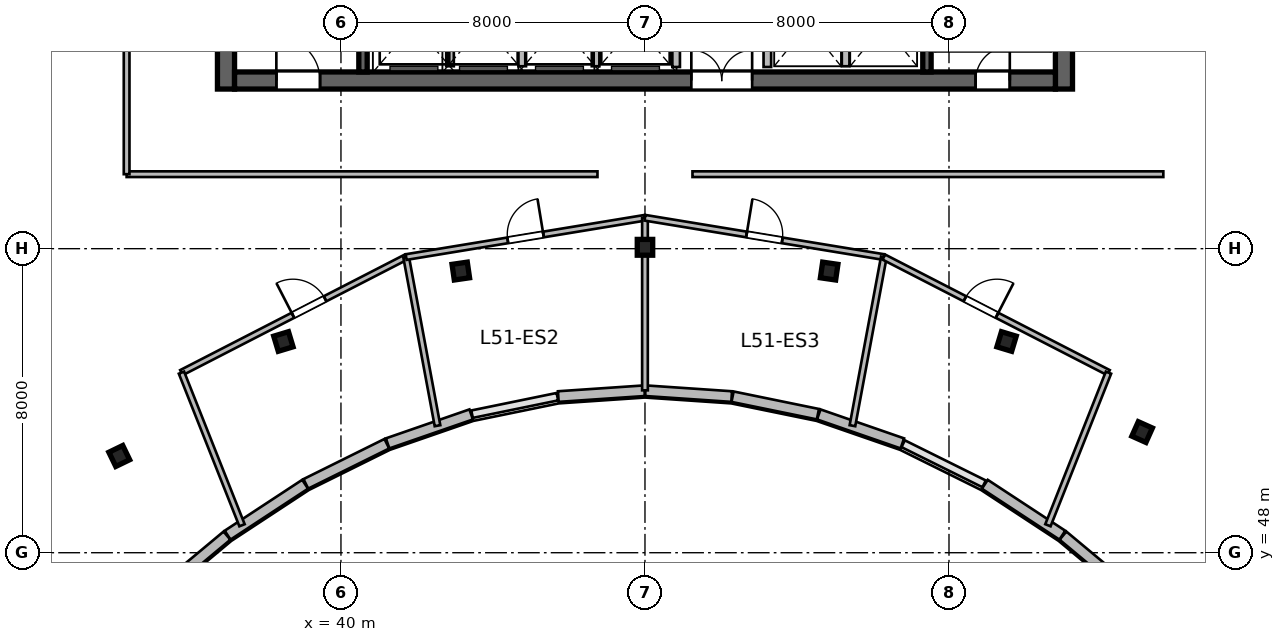
"""IFC4 building model, lengths in metres.
Left out: names, types, materials, properties, quantities, classifications, styles, units other than length and angle.
Written with IfcOpenShell. Run it as: python <this file> out.ifc"""

import sys

from ifc_helpers import new_model, si_unit, direction, frame, frame_2d, origin, origin_2d, place, context, subcontext, project, spatial, rectangle, i_section, extrude, source, transform, mapped, element, fill, save


model = new_model("IFC4")
c1 = context("Model", 3, precision=1e-05, world=origin(), true_north=direction((0.0, 1.0)))
c2 = subcontext(c1, "Body", "Model", "MODEL_VIEW")
j1 = project(units=[si_unit("LENGTHUNIT", "METRE"), si_unit("PLANEANGLEUNIT", "RADIAN")], contexts=[c1])
p1 = place(None, origin())
s1 = spatial("IfcSite", under=j1, at=p1, CompositionType="ELEMENT")
p2 = place(p1, origin())
s2 = spatial("IfcBuilding", under=s1, at=p2, CompositionType="ELEMENT")
p3 = place(p2, frame((0.0, 0.0, 211.8)))
s3 = spatial("IfcBuildingStorey", under=s2, at=p3, CompositionType="ELEMENT", Elevation=211.8)
m1 = source(origin(), c2, "Body", "SweptSolid", [
    extrude(rectangle(XDim=12.0, YDim=0.45, at=frame_2d((6.0, 0.0))), origin(), (0.0, 0.0, 1.0), 3.9),
])
for number, where, z_axis, x_axis in (
    (1, (36.975, 60.2, 0.0), (0.0, 0.0, 1.0), (0.0, 1.0, 0.0)),
    (2, (59.025, 60.2, 0.0), (0.0, 0.0, 1.0), (0.0, 1.0, 0.0)),
):
    element("IfcWall", number, at=place(p3, frame(where, z_axis=z_axis, x_axis=x_axis)), inside=s3, PredefinedType="SHEAR", context=c2, shape_type="MappedRepresentation", body=[
        mapped(m1, transform((0.0, 0.0, 0.0), scale=1.0)),
    ])
m2 = source(origin(), c2, "Body", "SweptSolid", [
    extrude(rectangle(XDim=21.6, YDim=0.45, at=frame_2d((10.8, 0.0))), origin(), (0.0, 0.0, 1.0), 3.9),
])
p4 = place(p3, frame((37.2, 60.425, 0.0), z_axis=(0.0, 0.0, 1.0), x_axis=(1.0, 0.0, 0.0)))
e3 = element("IfcWall", 3, at=p4, inside=s3, PredefinedType="SHEAR", context=c2, shape_type="MappedRepresentation", body=[
    mapped(m2, transform((0.0, 0.0, 0.0), scale=1.0)),
])
p5 = place(p4, frame((1.1, 0.0, 0.0)))
e4 = element("IfcOpeningElement", 4, at=p5, cuts=e3, PredefinedType="OPENING", context=c2, shape_type="SweptSolid", body=[
    extrude(rectangle(XDim=1.15, YDim=2.15, at=frame_2d((0.575, 1.075))), frame((0.0, 0.235, 0.0), z_axis=(0.0, -1.0, 0.0), x_axis=(1.0, 0.0, 0.0)), (0.0, 0.0, 1.0), 0.47),
])
p6 = place(p4, frame((19.5, 0.0, 0.0)))
e5 = element("IfcOpeningElement", 5, at=p6, cuts=e3, PredefinedType="OPENING", context=c2, shape_type="SweptSolid", body=[
    extrude(rectangle(XDim=0.9, YDim=2.1, at=frame_2d((0.45, 1.05))), frame((0.0, 0.235, 0.0), z_axis=(0.0, -1.0, 0.0), x_axis=(1.0, 0.0, 0.0)), (0.0, 0.0, 1.0), 0.47),
])
p7 = place(p4, frame((12.02, 0.0, 0.0)))
e6 = element("IfcOpeningElement", 6, at=p7, cuts=e3, PredefinedType="OPENING", context=c2, shape_type="SweptSolid", body=[
    extrude(rectangle(XDim=1.6, YDim=2.15, at=frame_2d((0.8, 1.075))), frame((0.0, 0.235, 0.0), z_axis=(0.0, -1.0, 0.0), x_axis=(1.0, 0.0, 0.0)), (0.0, 0.0, 1.0), 0.47),
])
m3 = source(origin(), c2, "Body", "SweptSolid", [
    extrude(rectangle(XDim=11.1, YDim=0.22, at=frame_2d((5.55, 0.0))), origin(), (0.0, 0.0, 1.0), 3.9),
])
p8 = place(p3, frame((40.58, 60.65, 0.0), z_axis=(0.0, 0.0, 1.0), x_axis=(0.0, 1.0, 0.0)))
e7 = element("IfcWall", 7, at=p8, inside=s3, PredefinedType="SHEAR", context=c2, shape_type="MappedRepresentation", body=[
    mapped(m3, transform((0.0, 0.0, 0.0), scale=1.0)),
])
p9 = place(p3, frame((55.42, 60.65, 0.0), z_axis=(0.0, 0.0, 1.0), x_axis=(0.0, 1.0, 0.0)))
e8 = element("IfcWall", 8, at=p9, inside=s3, PredefinedType="SHEAR", context=c2, shape_type="MappedRepresentation", body=[
    mapped(m3, transform((0.0, 0.0, 0.0), scale=1.0)),
])
p10 = place(p9, frame((9.595, 0.0, 0.0)))
e9 = element("IfcOpeningElement", 9, at=p10, cuts=e8, PredefinedType="OPENING", context=c2, shape_type="SweptSolid", body=[
    extrude(rectangle(XDim=1.15, YDim=2.15, at=frame_2d((0.575, 1.075))), frame((0.0, 0.12, 0.0), z_axis=(0.0, -1.0, 0.0), x_axis=(1.0, 0.0, 0.0)), (0.0, 0.0, 1.0), 0.24),
])
m4 = source(origin(), c2, "Body", "SweptSolid", [
    extrude(i_section(OverallWidth=0.406, OverallDepth=0.416, WebThickness=0.03, FlangeThickness=0.048, at=origin_2d()), origin(), (0.0, 0.0, 1.0), 3.9),
])
for number, where, z_axis, x_axis in (
    (10, (34.166, 50.545, 0.0), (0.0, 0.0, 1.0), (-0.436, 0.9, 0.0)),
    (11, (38.485, 53.558, 0.0), (0.0, 0.0, 1.0), (-0.289, 0.957, 0.0)),
    (12, (43.154, 55.411, 0.0), (0.0, 0.0, 1.0), (-0.143, 0.99, 0.0)),
    (13, (48.0, 56.036, 0.0), (0.0, 0.0, 1.0), (0.0, 1.0, 0.0)),
    (14, (52.846, 55.411, 0.0), (0.0, 0.0, 1.0), (0.143, 0.99, 0.0)),
    (15, (57.515, 53.558, 0.0), (0.0, 0.0, 1.0), (0.289, 0.957, 0.0)),
    (16, (61.082, 51.175, 0.0), (0.0, 0.0, 1.0), (0.409, 0.912, 0.0)),
):
    element("IfcColumn", number, at=place(p3, frame(where, z_axis=z_axis, x_axis=x_axis)), inside=s3, PredefinedType="COLUMN", context=c2, shape_type="MappedRepresentation", body=[
        mapped(m4, transform((0.0, 0.0, 0.0), scale=1.0)),
    ])
m5 = source(origin(), c2, "Body", "SweptSolid", [
    extrude(rectangle(XDim=2.511, YDim=0.28, at=frame_2d((1.256, 0.0))), origin(), (0.0, 0.0, 1.0), 3.64),
])
p11 = place(p3, frame((60.928, 46.841, 0.0), z_axis=(0.0, 0.0, 1.0), x_axis=(-0.767910416122, 0.640557251782, 0.0)))
e17 = element("IfcWall", 17, at=p11, inside=s3, PredefinedType="SOLIDWALL", context=c2, shape_type="MappedRepresentation", body=[
    mapped(m5, transform((0.0, 0.0, 0.0), scale=1.0)),
])
m6 = source(origin(), c2, "Body", "SweptSolid", [
    extrude(rectangle(XDim=2.44, YDim=0.28, at=frame_2d((1.22, 0.0))), origin(), (0.0, 0.0, 1.0), 3.64),
])
p12 = place(p3, frame((58.983, 48.462, 0.0), z_axis=(0.0, 0.0, 1.0), x_axis=(-0.83598480459, 0.548752591333, 0.0)))
e18 = element("IfcWall", 18, at=p12, inside=s3, PredefinedType="SOLIDWALL", context=c2, shape_type="MappedRepresentation", body=[
    mapped(m6, transform((0.0, 0.0, 0.0), scale=1.0)),
])
m7 = source(origin(), c2, "Body", "SweptSolid", [
    extrude(rectangle(XDim=2.328, YDim=0.28, at=frame_2d((1.164, 0.0))), origin(), (0.0, 0.0, 1.0), 3.64),
])
p13 = place(p3, frame((54.772, 50.876, 0.0), z_axis=(0.0, 0.0, 1.0), x_axis=(-0.944872545641, 0.32743834915, 0.0)))
e19 = element("IfcWall", 19, at=p13, inside=s3, PredefinedType="SOLIDWALL", context=c2, shape_type="MappedRepresentation", body=[
    mapped(m7, transform((0.0, 0.0, 0.0), scale=1.0)),
])
m8 = source(origin(), c2, "Body", "SweptSolid", [
    extrude(rectangle(XDim=2.292, YDim=0.28, at=frame_2d((1.146, 0.0))), origin(), (0.0, 0.0, 1.0), 3.64),
])
p14 = place(p3, frame((52.55, 51.645, 0.0), z_axis=(0.0, 0.0, 1.0), x_axis=(-0.979635482689, 0.200784264963, 0.0)))
e20 = element("IfcWall", 20, at=p14, inside=s3, PredefinedType="SOLIDWALL", context=c2, shape_type="MappedRepresentation", body=[
    mapped(m8, transform((0.0, 0.0, 0.0), scale=1.0)),
])
m9 = source(origin(), c2, "Body", "SweptSolid", [
    extrude(rectangle(XDim=2.274, YDim=0.28, at=frame_2d((1.137, 0.0))), origin(), (0.0, 0.0, 1.0), 3.64),
])
for number, where, z_axis, x_axis in (
    (21, (50.281, 52.109, 0.0), (0.0, 0.0, 1.0), (-0.998, 0.068, 0.0)),
    (22, (47.988, 52.263, 0.0), (0.0, 0.0, 1.0), (-0.998, -0.068, 0.0)),
):
    element("IfcWall", number, at=place(p3, frame(where, z_axis=z_axis, x_axis=x_axis)), inside=s3, PredefinedType="SOLIDWALL", context=c2, shape_type="MappedRepresentation", body=[
        mapped(m9, transform((0.0, 0.0, 0.0), scale=1.0)),
    ])
p15 = place(p3, frame((43.427, 51.639, 0.0), z_axis=(0.0, 0.0, 1.0), x_axis=(-0.944872545641, -0.32743834915, 0.0)))
e23 = element("IfcWall", 23, at=p15, inside=s3, PredefinedType="SOLIDWALL", context=c2, shape_type="MappedRepresentation", body=[
    mapped(m7, transform((0.0, 0.0, 0.0), scale=1.0)),
])
m10 = source(origin(), c2, "Body", "SweptSolid", [
    extrude(rectangle(XDim=2.378, YDim=0.28, at=frame_2d((1.189, 0.0))), origin(), (0.0, 0.0, 1.0), 3.64),
])
p16 = place(p3, frame((41.207, 50.868, 0.0), z_axis=(0.0, 0.0, 1.0), x_axis=(-0.895941616831, -0.444171835252, 0.0)))
e24 = element("IfcWall", 24, at=p16, inside=s3, PredefinedType="SOLIDWALL", context=c2, shape_type="MappedRepresentation", body=[
    mapped(m10, transform((0.0, 0.0, 0.0), scale=1.0)),
])
p17 = place(p3, frame((39.057, 49.801, 0.0), z_axis=(0.0, 0.0, 1.0), x_axis=(-0.83598480459, -0.548752591333, 0.0)))
e25 = element("IfcWall", 25, at=p17, inside=s3, PredefinedType="SOLIDWALL", context=c2, shape_type="MappedRepresentation", body=[
    mapped(m6, transform((0.0, 0.0, 0.0), scale=1.0)),
])
p18 = place(p3, frame((37.001, 48.449, 0.0), z_axis=(0.0, 0.0, 1.0), x_axis=(-0.767910416122, -0.640557251782, 0.0)))
e26 = element("IfcWall", 26, at=p18, inside=s3, PredefinedType="SOLIDWALL", context=c2, shape_type="MappedRepresentation", body=[
    mapped(m5, transform((0.0, 0.0, 0.0), scale=1.0)),
])
m11 = source(origin(), c2, "Body", "SweptSolid", [
    extrude(rectangle(XDim=2.24, YDim=0.2, at=frame_2d((1.12, 0.0))), origin(), (0.0, 0.0, 1.0), 3.64),
])
for number, where, z_axis, x_axis in (
    (27, (48.82, 60.78, 0.0), (0.0, 0.0, 1.0), (0.0, 1.0, 0.0)),
    (28, (51.22, 60.78, 0.0), (0.0, 0.0, 1.0), (0.0, 1.0, 0.0)),
):
    element("IfcWall", number, at=place(p3, frame(where, z_axis=z_axis, x_axis=x_axis)), inside=s3, PredefinedType="SOLIDWALL", context=c2, shape_type="MappedRepresentation", body=[
        mapped(m11, transform((0.0, 0.0, 0.0), scale=1.0)),
    ])
m12 = source(origin(), c2, "Body", "SweptSolid", [
    extrude(rectangle(XDim=2.2, YDim=0.2, at=frame_2d((1.1, 0.0))), origin(), (0.0, 0.0, 1.0), 3.64),
])
for number, where, z_axis, x_axis in (
    (29, (42.87, 60.8, 0.0), (0.0, 0.0, 1.0), (0.0, 1.0, 0.0)),
    (30, (44.77, 60.8, 0.0), (0.0, 0.0, 1.0), (0.0, 1.0, 0.0)),
    (31, (46.7, 60.8, 0.0), (0.0, 0.0, 1.0), (0.0, 1.0, 0.0)),
    (32, (53.28, 60.8, 0.0), (0.0, 0.0, 1.0), (0.0, 1.0, 0.0)),
):
    element("IfcWall", number, at=place(p3, frame(where, z_axis=z_axis, x_axis=x_axis)), inside=s3, PredefinedType="SOLIDWALL", context=c2, shape_type="MappedRepresentation", body=[
        mapped(m12, transform((0.0, 0.0, 0.0), scale=1.0)),
    ])
m13 = source(origin(), c2, "Body", "SweptSolid", [
    extrude(rectangle(XDim=6.648, YDim=0.15, at=frame_2d((3.324, 0.0))), origin(), (0.0, 0.0, 1.0), 3.64),
])
p19 = place(p3, frame((35.803, 52.738, 0.0), z_axis=(0.0, 0.0, 1.0), x_axis=(0.889264330224, 0.457393649925, 0.0)))
e33 = element("IfcWall", 33, at=p19, inside=s3, PredefinedType="PARTITIONING", context=c2, shape_type="MappedRepresentation", body=[
    mapped(m13, transform((0.0, 0.0, 0.0), scale=1.0)),
])
p20 = place(p19, frame((3.299, 0.0, 0.0)))
e34 = element("IfcOpeningElement", 34, at=p20, cuts=e33, PredefinedType="OPENING", context=c2, shape_type="SweptSolid", body=[
    extrude(rectangle(XDim=0.95, YDim=2.1, at=frame_2d((0.475, 1.05))), frame((0.0, 0.085, 0.0), z_axis=(0.0, -1.0, 0.0), x_axis=(1.0, 0.0, 0.0)), (0.0, 0.0, 1.0), 0.17),
])
m14 = source(origin(), c2, "Body", "SweptSolid", [
    extrude(rectangle(XDim=4.32, YDim=0.15, at=frame_2d((2.16, 0.0))), origin(), (0.0, 0.0, 1.0), 3.64),
])
p21 = place(p3, frame((37.396, 48.723, 0.0), z_axis=(0.0, 0.0, 1.0), x_axis=(-0.368846295269, 0.929490403644, 0.0)))
e35 = element("IfcWall", 35, at=p21, inside=s3, PredefinedType="PARTITIONING", context=c2, shape_type="MappedRepresentation", body=[
    mapped(m14, transform((0.0, 0.0, 0.0), scale=1.0)),
])
m15 = source(origin(), c2, "Body", "SweptSolid", [
    extrude(rectangle(XDim=4.513, YDim=0.15, at=frame_2d((2.257, 0.0))), origin(), (0.0, 0.0, 1.0), 3.64),
])
p22 = place(p3, frame((42.541, 51.342, 0.0), z_axis=(0.0, 0.0, 1.0), x_axis=(-0.182949257828, 0.983122357115, 0.0)))
e36 = element("IfcWall", 36, at=p22, inside=s3, PredefinedType="PARTITIONING", context=c2, shape_type="MappedRepresentation", body=[
    mapped(m15, transform((0.0, 0.0, 0.0), scale=1.0)),
])
m16 = source(origin(), c2, "Body", "SweptSolid", [
    extrude(rectangle(XDim=6.37, YDim=0.15, at=frame_2d((3.185, 0.0))), origin(), (0.0, 0.0, 1.0), 3.64),
])
p23 = place(p3, frame((41.715, 55.779, 0.0), z_axis=(0.0, 0.0, 1.0), x_axis=(0.986731594983, 0.162359968783, 0.0)))
e37 = element("IfcWall", 37, at=p23, inside=s3, PredefinedType="PARTITIONING", context=c2, shape_type="MappedRepresentation", body=[
    mapped(m16, transform((0.0, 0.0, 0.0), scale=1.0)),
])
p24 = place(p23, frame((2.71, 0.0, 0.0)))
e38 = element("IfcOpeningElement", 38, at=p24, cuts=e37, PredefinedType="OPENING", context=c2, shape_type="SweptSolid", body=[
    extrude(rectangle(XDim=0.95, YDim=2.1, at=frame_2d((0.475, 1.05))), frame((0.0, 0.085, 0.0), z_axis=(0.0, -1.0, 0.0), x_axis=(1.0, 0.0, 0.0)), (0.0, 0.0, 1.0), 0.17),
])
m17 = source(origin(), c2, "Body", "SweptSolid", [
    extrude(rectangle(XDim=4.541, YDim=0.15, at=frame_2d((2.27, 0.0))), origin(), (0.0, 0.0, 1.0), 3.085),
])
p25 = place(p3, frame((48.0, 52.273, 0.0), z_axis=(0.0, 0.0, 1.0), x_axis=(0.0, 1.0, 0.0)))
e39 = element("IfcWall", 39, at=p25, inside=s3, PredefinedType="PARTITIONING", context=c2, shape_type="MappedRepresentation", body=[
    mapped(m17, transform((0.0, 0.0, 0.0), scale=1.0)),
])
p26 = place(p3, frame((48.0, 56.813, 0.0), z_axis=(0.0, 0.0, 1.0), x_axis=(0.986731594983, -0.162359968783, 0.0)))
e40 = element("IfcWall", 40, at=p26, inside=s3, PredefinedType="PARTITIONING", context=c2, shape_type="MappedRepresentation", body=[
    mapped(m16, transform((0.0, 0.0, 0.0), scale=1.0)),
])
p27 = place(p26, frame((2.71, 0.0, 0.0)))
e41 = element("IfcOpeningElement", 41, at=p27, cuts=e40, PredefinedType="OPENING", context=c2, shape_type="SweptSolid", body=[
    extrude(rectangle(XDim=0.95, YDim=2.1, at=frame_2d((0.475, 1.05))), frame((0.0, 0.085, 0.0), z_axis=(0.0, -1.0, 0.0), x_axis=(1.0, 0.0, 0.0)), (0.0, 0.0, 1.0), 0.17),
])
p28 = place(p3, frame((53.459, 51.342, 0.0), z_axis=(0.0, 0.0, 1.0), x_axis=(0.182949257828, 0.983122357115, 0.0)))
e42 = element("IfcWall", 42, at=p28, inside=s3, PredefinedType="PARTITIONING", context=c2, shape_type="MappedRepresentation", body=[
    mapped(m15, transform((0.0, 0.0, 0.0), scale=1.0)),
])
p29 = place(p3, frame((54.285, 55.779, 0.0), z_axis=(0.0, 0.0, 1.0), x_axis=(0.889264330224, -0.457393649925, 0.0)))
e43 = element("IfcWall", 43, at=p29, inside=s3, PredefinedType="PARTITIONING", context=c2, shape_type="MappedRepresentation", body=[
    mapped(m13, transform((0.0, 0.0, 0.0), scale=1.0)),
])
p30 = place(p29, frame((2.399, 0.0, 0.0)))
e44 = element("IfcOpeningElement", 44, at=p30, cuts=e43, PredefinedType="OPENING", context=c2, shape_type="SweptSolid", body=[
    extrude(rectangle(XDim=0.95, YDim=2.1, at=frame_2d((0.475, 1.05))), frame((0.0, 0.085, 0.0), z_axis=(0.0, -1.0, 0.0), x_axis=(1.0, 0.0, 0.0)), (0.0, 0.0, 1.0), 0.17),
])
p31 = place(p3, frame((58.604, 48.723, 0.0), z_axis=(0.0, 0.0, 1.0), x_axis=(0.368846295269, 0.929490403644, 0.0)))
e45 = element("IfcWall", 45, at=p31, inside=s3, PredefinedType="PARTITIONING", context=c2, shape_type="MappedRepresentation", body=[
    mapped(m14, transform((0.0, 0.0, 0.0), scale=1.0)),
])
m18 = source(origin(), c2, "Body", "SweptSolid", [
    extrude(rectangle(XDim=12.39, YDim=0.15, at=frame_2d((6.195, 0.0))), origin(), (0.0, 0.0, 1.0), 3.64),
])
for number, where, z_axis, x_axis in (
    (46, (34.36, 57.96, 0.0), (0.0, 0.0, 1.0), (1.0, 0.0, 0.0)),
    (47, (49.25, 57.96, 0.0), (0.0, 0.0, 1.0), (1.0, 0.0, 0.0)),
):
    element("IfcWall", number, at=place(p3, frame(where, z_axis=z_axis, x_axis=x_axis)), inside=s3, PredefinedType="PARTITIONING", context=c2, shape_type="MappedRepresentation", body=[
        mapped(m18, transform((0.0, 0.0, 0.0), scale=1.0)),
    ])
m19 = source(origin(), c2, "Body", "SweptSolid", [
    extrude(rectangle(XDim=3.54, YDim=0.15, at=frame_2d((1.77, 0.0))), origin(), (0.0, 0.0, 1.0), 3.64),
])
p32 = place(p3, frame((34.36, 57.96, 0.0), z_axis=(0.0, 0.0, 1.0), x_axis=(0.0, 1.0, 0.0)))
e48 = element("IfcWall", 48, at=p32, inside=s3, PredefinedType="PARTITIONING", context=c2, shape_type="MappedRepresentation", body=[
    mapped(m19, transform((0.0, 0.0, 0.0), scale=1.0)),
])
m20 = source(origin(), c2, "Body", "SweptSolid", [
    extrude(rectangle(XDim=1.15, YDim=2.15, at=frame_2d((0.575, 1.075))), frame((0.0, 0.025, 0.0), z_axis=(0.0, -1.0, 0.0), x_axis=(1.0, 0.0, 0.0)), (0.0, 0.0, 1.0), 0.05),
])
p33 = place(p5, origin())
e49 = element("IfcDoor", 49, at=p33, inside=s3, OperationType="SINGLE_SWING_LEFT", PredefinedType="DOOR", context=c2, shape_type="MappedRepresentation", body=[
    mapped(m20, transform((0.0, 0.0, 0.0), scale=1.0)),
])
fill(e4, e49)
m21 = source(origin(), c2, "Body", "SweptSolid", [
    extrude(rectangle(XDim=0.9, YDim=2.1, at=frame_2d((0.45, 1.05))), frame((0.0, 0.025, 0.0), z_axis=(0.0, -1.0, 0.0), x_axis=(1.0, 0.0, 0.0)), (0.0, 0.0, 1.0), 0.05),
])
p34 = place(p6, origin())
e50 = element("IfcDoor", 50, at=p34, inside=s3, OperationType="SINGLE_SWING_RIGHT", PredefinedType="DOOR", context=c2, shape_type="MappedRepresentation", body=[
    mapped(m21, transform((0.0, 0.0, 0.0), scale=1.0)),
])
fill(e5, e50)
m22 = source(origin(), c2, "Body", "SweptSolid", [
    extrude(rectangle(XDim=1.6, YDim=2.15, at=frame_2d((0.8, 1.075))), frame((0.0, 0.025, 0.0), z_axis=(0.0, -1.0, 0.0), x_axis=(1.0, 0.0, 0.0)), (0.0, 0.0, 1.0), 0.05),
])
p35 = place(p7, origin())
e51 = element("IfcDoor", 51, at=p35, inside=s3, OperationType="DOUBLE_DOOR_SINGLE_SWING", PredefinedType="DOOR", context=c2, shape_type="MappedRepresentation", body=[
    mapped(m22, transform((0.0, 0.0, 0.0), scale=1.0)),
])
fill(e6, e51)
m23 = source(origin(), c2, "Body", "SweptSolid", [
    extrude(rectangle(XDim=0.95, YDim=2.1, at=frame_2d((0.475, 1.05))), frame((0.0, 0.025, 0.0), z_axis=(0.0, -1.0, 0.0), x_axis=(1.0, 0.0, 0.0)), (0.0, 0.0, 1.0), 0.05),
])
p36 = place(p20, origin())
e52 = element("IfcDoor", 52, at=p36, inside=s3, OperationType="SINGLE_SWING_LEFT", PredefinedType="DOOR", context=c2, shape_type="MappedRepresentation", body=[
    mapped(m23, transform((0.0, 0.0, 0.0), scale=1.0)),
])
fill(e34, e52)
p37 = place(p24, origin())
e53 = element("IfcDoor", 53, at=p37, inside=s3, OperationType="SINGLE_SWING_RIGHT", PredefinedType="DOOR", context=c2, shape_type="MappedRepresentation", body=[
    mapped(m23, transform((0.0, 0.0, 0.0), scale=1.0)),
])
fill(e38, e53)
p38 = place(p27, origin())
e54 = element("IfcDoor", 54, at=p38, inside=s3, OperationType="SINGLE_SWING_LEFT", PredefinedType="DOOR", context=c2, shape_type="MappedRepresentation", body=[
    mapped(m23, transform((0.0, 0.0, 0.0), scale=1.0)),
])
fill(e41, e54)
p39 = place(p30, origin())
e55 = element("IfcDoor", 55, at=p39, inside=s3, OperationType="SINGLE_SWING_RIGHT", PredefinedType="DOOR", context=c2, shape_type="MappedRepresentation", body=[
    mapped(m23, transform((0.0, 0.0, 0.0), scale=1.0)),
])
fill(e44, e55)
save(model, sys.argv[1])
